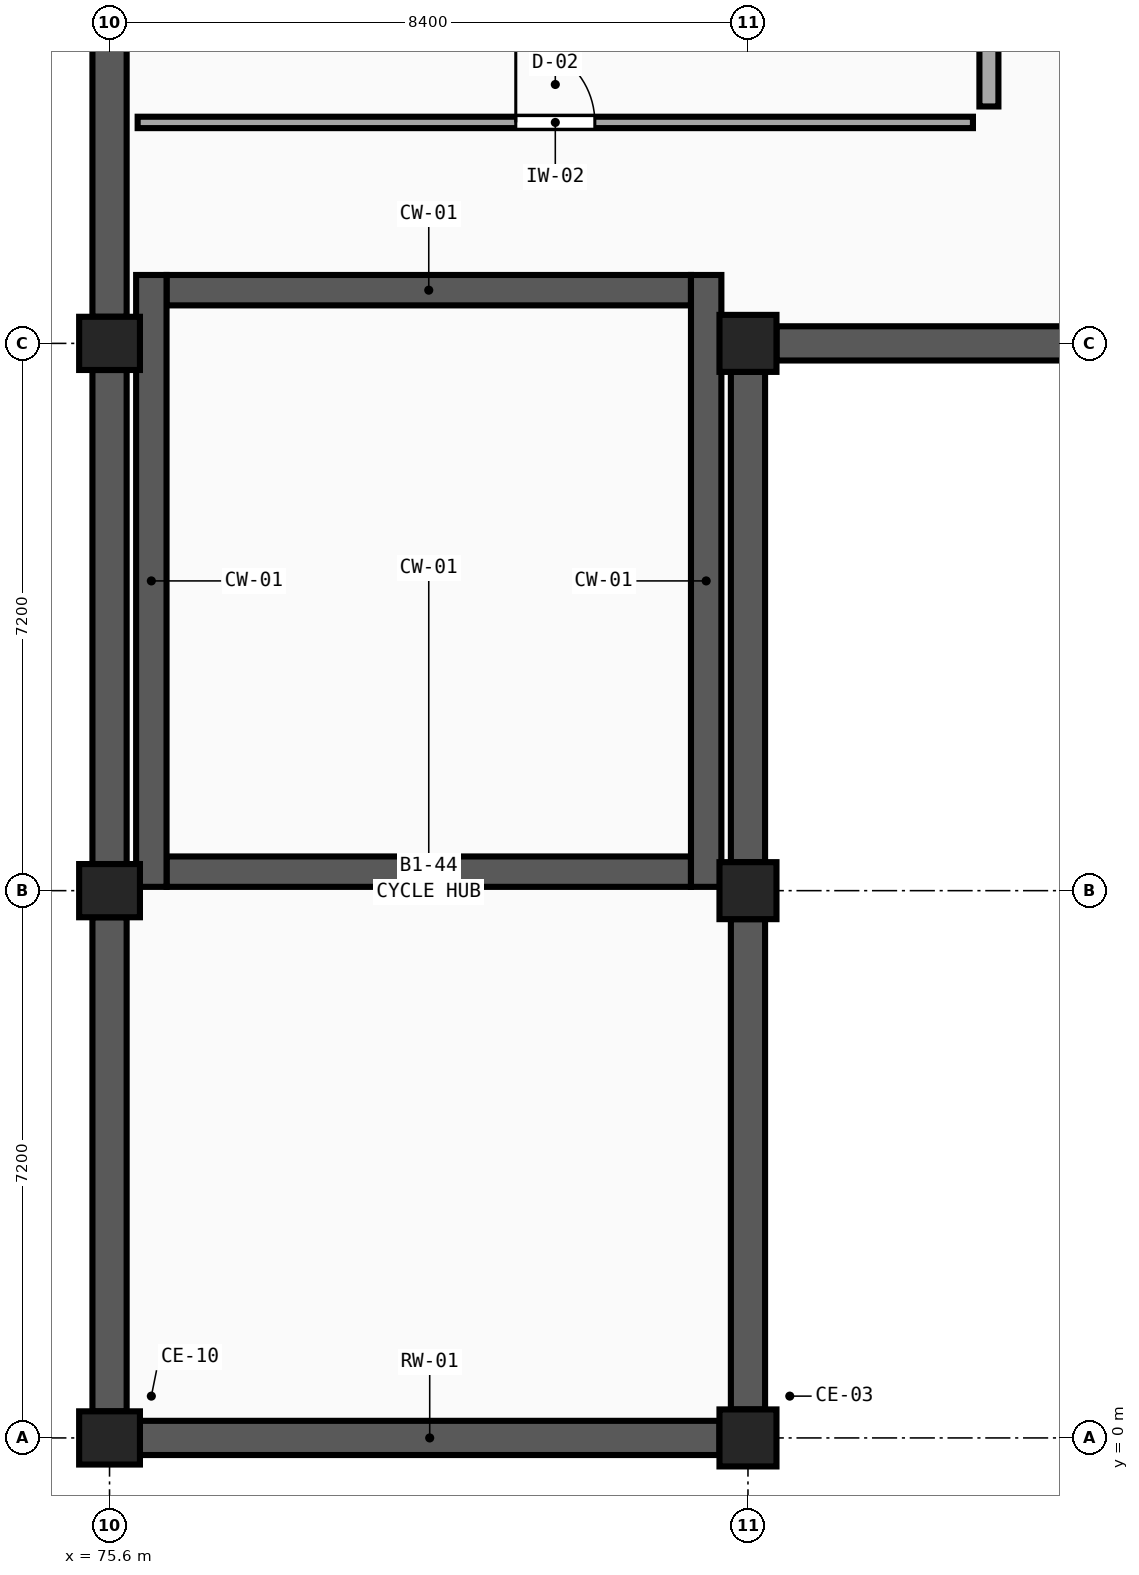
"""IFC4 building model, lengths in metres.
Left out: names, types, materials, properties, quantities, classifications, styles, units other than length and angle.
Written with IfcOpenShell. Run it as: python <this file> out.ifc"""

import sys

from ifc_helpers import new_model, si_unit, direction, frame, frame_2d, origin, origin_2d, place, context, subcontext, project, spatial, rectangle, extrude, element, fill, save


model = new_model("IFC4")
c1 = context("Model", 3, precision=1e-05, world=origin(), true_north=direction((0.0, 1.0)))
c2 = subcontext(c1, "Body", "Model", "MODEL_VIEW")
j1 = project(units=[si_unit("LENGTHUNIT", "METRE"), si_unit("PLANEANGLEUNIT", "RADIAN")], contexts=[c1])
p1 = place(None, origin())
s1 = spatial("IfcSite", under=j1, at=p1, CompositionType="ELEMENT")
p2 = place(p1, origin())
s2 = spatial("IfcBuilding", under=s1, at=p2, CompositionType="ELEMENT")
p3 = place(p2, frame((0.0, 0.0, -5.4)))
s3 = spatial("IfcBuildingStorey", under=s2, at=p3, CompositionType="ELEMENT", Elevation=-5.4)
for number, where, z_axis, x_axis in (
    (1, (75.6, 0.0, 0.0), (0.0, 0.0, 1.0), (1.0, 0.0, 0.0)),
    (2, (75.6, 7.2, 0.0), (0.0, 0.0, 1.0), (1.0, 0.0, 0.0)),
    (3, (75.6, 14.4, 0.0), (0.0, 0.0, 1.0), (1.0, 0.0, 0.0)),
):
    element("IfcColumn", number, at=place(p3, frame(where, z_axis=z_axis, x_axis=x_axis)), inside=s3, PredefinedType="COLUMN", context=c2, shape_type="SweptSolid", body=[
        extrude(rectangle(XDim=0.8, YDim=0.7, at=origin_2d()), origin(), (0.0, 0.0, 1.0), 5.4),
    ])
for number, where, z_axis, x_axis in (
    (4, (84.0, 0.0, 0.0), (0.0, 0.0, 1.0), (1.0, 0.0, 0.0)),
    (5, (84.0, 7.2, 0.0), (0.0, 0.0, 1.0), (1.0, 0.0, 0.0)),
    (6, (84.0, 14.4, 0.0), (0.0, 0.0, 1.0), (1.0, 0.0, 0.0)),
):
    element("IfcColumn", number, at=place(p3, frame(where, z_axis=z_axis, x_axis=x_axis)), inside=s3, PredefinedType="COLUMN", context=c2, shape_type="SweptSolid", body=[
        extrude(rectangle(XDim=0.75, YDim=0.75, at=origin_2d()), origin(), (0.0, 0.0, 1.0), 5.4),
    ])
p4 = place(p3, frame((83.625, 0.0, 0.0), z_axis=(0.0, 0.0, 1.0), x_axis=(-1.0, 0.0, 0.0)))
e7 = element("IfcWall", 7, at=p4, inside=s3, PredefinedType="USERDEFINED", context=c2, shape_type="SweptSolid", body=[
    extrude(rectangle(XDim=7.625, YDim=0.45, at=frame_2d((3.812, 0.0))), origin(), (0.0, 0.0, 1.0), 4.5),
])
p5 = place(p3, frame((84.0, 6.825, 0.0), z_axis=(0.0, 0.0, 1.0), x_axis=(0.0, -1.0, 0.0)))
e8 = element("IfcWall", 8, at=p5, inside=s3, PredefinedType="USERDEFINED", context=c2, shape_type="SweptSolid", body=[
    extrude(rectangle(XDim=6.45, YDim=0.45, at=frame_2d((3.225, 0.0))), origin(), (0.0, 0.0, 1.0), 4.5),
])
p6 = place(p3, frame((75.6, 0.35, 0.0), z_axis=(0.0, 0.0, 1.0), x_axis=(0.0, 1.0, 0.0)))
e9 = element("IfcWall", 9, at=p6, inside=s3, PredefinedType="USERDEFINED", context=c2, shape_type="SweptSolid", body=[
    extrude(rectangle(XDim=6.5, YDim=0.45, at=frame_2d((3.25, 0.0))), origin(), (0.0, 0.0, 1.0), 4.5),
])
p7 = place(p3, frame((84.0, 14.025, 0.0), z_axis=(0.0, 0.0, 1.0), x_axis=(0.0, -1.0, 0.0)))
e10 = element("IfcWall", 10, at=p7, inside=s3, PredefinedType="USERDEFINED", context=c2, shape_type="SweptSolid", body=[
    extrude(rectangle(XDim=6.45, YDim=0.45, at=frame_2d((3.225, 0.0))), origin(), (0.0, 0.0, 1.0), 4.5),
])
for number, where, z_axis, x_axis in (
    (11, (75.6, 7.55, 0.0), (0.0, 0.0, 1.0), (0.0, 1.0, 0.0)),
    (12, (75.6, 14.75, 0.0), (0.0, 0.0, 1.0), (0.0, 1.0, 0.0)),
):
    element("IfcWall", number, at=place(p3, frame(where, z_axis=z_axis, x_axis=x_axis)), inside=s3, PredefinedType="USERDEFINED", context=c2, shape_type="SweptSolid", body=[
        extrude(rectangle(XDim=6.5, YDim=0.45, at=frame_2d((3.25, 0.0))), origin(), (0.0, 0.0, 1.0), 4.5),
    ])
p8 = place(p3, frame((92.0, 14.4, 0.0), z_axis=(0.0, 0.0, 1.0), x_axis=(-1.0, 0.0, 0.0)))
e13 = element("IfcWall", 13, at=p8, inside=s3, PredefinedType="USERDEFINED", context=c2, shape_type="SweptSolid", body=[
    extrude(rectangle(XDim=7.625, YDim=0.45, at=frame_2d((3.812, 0.0))), origin(), (0.0, 0.0, 1.0), 4.5),
])
for number, where, z_axis, x_axis in (
    (14, (83.25, 7.45, 0.0), (0.0, 0.0, 1.0), (-1.0, 0.0, 0.0)),
    (15, (76.35, 15.1, 0.0), (0.0, 0.0, 1.0), (1.0, 0.0, 0.0)),
):
    element("IfcWall", number, at=place(p3, frame(where, z_axis=z_axis, x_axis=x_axis)), inside=s3, PredefinedType="SHEAR", context=c2, shape_type="SweptSolid", body=[
        extrude(rectangle(XDim=6.9, YDim=0.4, at=frame_2d((3.45, 0.0))), origin(), (0.0, 0.0, 1.0), 5.4),
    ])
for number, where, z_axis, x_axis in (
    (16, (76.15, 15.3, 0.0), (0.0, 0.0, 1.0), (0.0, -1.0, 0.0)),
    (17, (83.45, 7.25, 0.0), (0.0, 0.0, 1.0), (0.0, 1.0, 0.0)),
):
    element("IfcWall", number, at=place(p3, frame(where, z_axis=z_axis, x_axis=x_axis)), inside=s3, PredefinedType="SHEAR", context=c2, shape_type="SweptSolid", body=[
        extrude(rectangle(XDim=8.05, YDim=0.4, at=frame_2d((4.025, 0.0))), origin(), (0.0, 0.0, 1.0), 5.4),
    ])
p9 = place(p3, frame((75.97, 17.307, 0.0), z_axis=(0.0, 0.0, 1.0), x_axis=(1.0, 0.0, 0.0)))
e18 = element("IfcWall", 18, at=p9, inside=s3, PredefinedType="PARTITIONING", context=c2, shape_type="SweptSolid", body=[
    extrude(rectangle(XDim=10.99, YDim=0.15, at=frame_2d((5.495, 0.0))), origin(), (0.0, 0.0, 1.0), 5.05),
])
p10 = place(p9, frame((4.975, 0.0, 0.0)))
e19 = element("IfcOpeningElement", 19, at=p10, cuts=e18, PredefinedType="OPENING", context=c2, shape_type="SweptSolid", body=[
    extrude(rectangle(XDim=1.04, YDim=2.05, at=frame_2d((0.52, 1.025))), frame((0.0, 0.095, 0.0), z_axis=(0.0, -1.0, 0.0), x_axis=(1.0, 0.0, 0.0)), (0.0, 0.0, 1.0), 0.19),
])
p11 = place(p3, frame((87.17, 17.517, 0.0), z_axis=(0.0, 0.0, 1.0), x_axis=(0.0, 1.0, 0.0)))
e20 = element("IfcWall", 20, at=p11, inside=s3, PredefinedType="SOLIDWALL", context=c2, shape_type="SweptSolid", body=[
    extrude(rectangle(XDim=3.713, YDim=0.25, at=frame_2d((1.856, 0.0))), origin(), (0.0, 0.0, 1.0), 5.05),
])
p12 = place(p10, origin())
e21 = element("IfcDoor", 21, at=p12, inside=s3, OperationType="SINGLE_SWING_LEFT", PredefinedType="DOOR", context=c2, shape_type="SweptSolid", body=[
    extrude(rectangle(XDim=1.04, YDim=2.05, at=frame_2d((0.52, 1.025))), frame((0.0, 0.025, 0.0), z_axis=(0.0, -1.0, 0.0), x_axis=(1.0, 0.0, 0.0)), (0.0, 0.0, 1.0), 0.05),
])
fill(e19, e21)
save(model, sys.argv[1])
